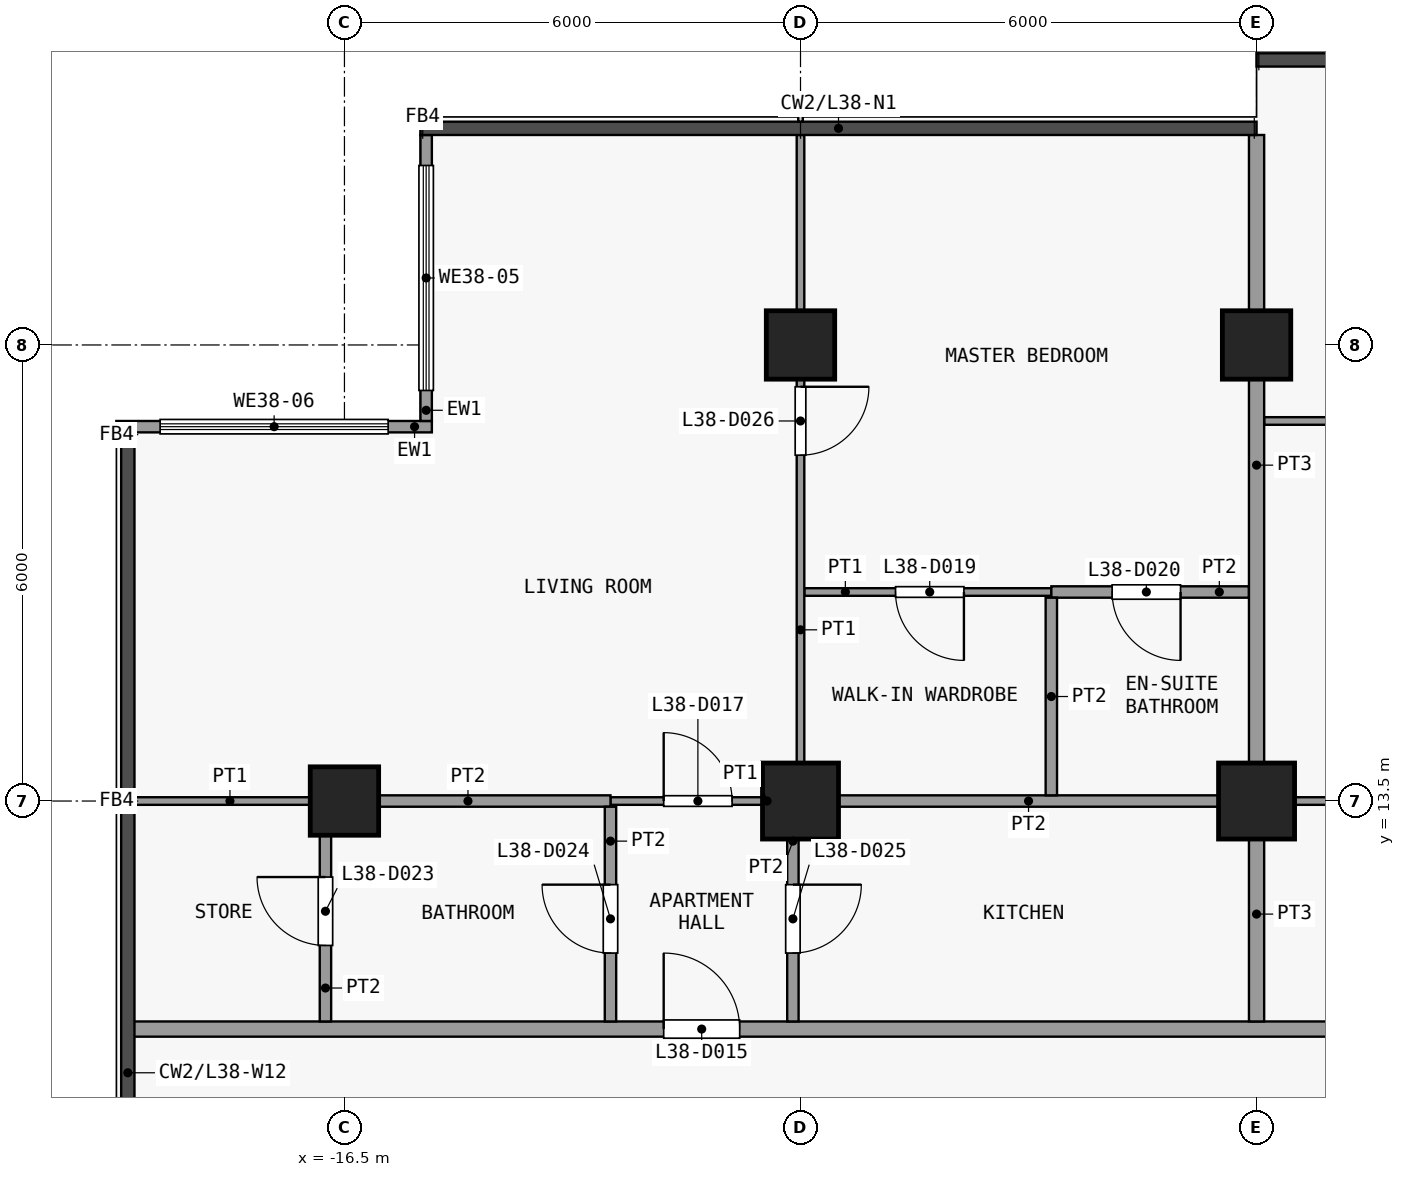
"""IFC4 building model, lengths in metres.
Left out: names, types, materials, properties, quantities, classifications, styles, units other than length and angle.
Written with IfcOpenShell. Run it as: python <this file> out.ifc"""

import sys

from ifc_helpers import new_model, si_unit, direction, frame, frame_2d, origin, origin_2d, place, context, subcontext, project, spatial, rectangle, extrude, element, fill, save


model = new_model("IFC4")
c1 = context("Model", 3, precision=1e-05, world=origin(), true_north=direction((0.0, 1.0)))
c2 = subcontext(c1, "Body", "Model", "MODEL_VIEW")
j1 = project(units=[si_unit("LENGTHUNIT", "METRE"), si_unit("PLANEANGLEUNIT", "RADIAN")], contexts=[c1])
p1 = place(None, origin())
s1 = spatial("IfcSite", under=j1, at=p1, CompositionType="ELEMENT")
p2 = place(p1, origin())
s2 = spatial("IfcBuilding", under=s1, at=p2, CompositionType="ELEMENT")
p3 = place(p2, frame((0.0, 0.0, 156.5)))
s3 = spatial("IfcBuildingStorey", under=s2, at=p3, CompositionType="ELEMENT", Elevation=156.5)
p4 = place(p3, frame((-16.5, 13.5, 0.0), z_axis=(0.0, 0.0, 1.0), x_axis=(1.0, 0.0, 0.0)))
e1 = element("IfcColumn", 1, at=p4, inside=s3, PredefinedType="COLUMN", context=c2, shape_type="SweptSolid", body=[
    extrude(rectangle(XDim=0.9, YDim=0.9, at=origin_2d()), origin(), (0.0, 0.0, 1.0), 3.6),
])
p5 = place(p3, frame((-10.5, 13.5, 0.0), z_axis=(0.0, 0.0, 1.0), x_axis=(1.0, 0.0, 0.0)))
e2 = element("IfcColumn", 2, at=p5, inside=s3, PredefinedType="COLUMN", context=c2, shape_type="SweptSolid", body=[
    extrude(rectangle(XDim=1.0, YDim=1.0, at=origin_2d()), origin(), (0.0, 0.0, 1.0), 3.6),
])
p6 = place(p3, frame((-10.5, 19.5, 0.0), z_axis=(0.0, 0.0, 1.0), x_axis=(1.0, 0.0, 0.0)))
e3 = element("IfcColumn", 3, at=p6, inside=s3, PredefinedType="COLUMN", context=c2, shape_type="SweptSolid", body=[
    extrude(rectangle(XDim=0.9, YDim=0.9, at=origin_2d()), origin(), (0.0, 0.0, 1.0), 3.6),
])
p7 = place(p3, frame((-4.5, 13.5, 0.0), z_axis=(0.0, 0.0, 1.0), x_axis=(1.0, 0.0, 0.0)))
e4 = element("IfcColumn", 4, at=p7, inside=s3, PredefinedType="COLUMN", context=c2, shape_type="SweptSolid", body=[
    extrude(rectangle(XDim=1.0, YDim=1.0, at=origin_2d()), origin(), (0.0, 0.0, 1.0), 3.6),
])
p8 = place(p3, frame((-4.5, 19.5, 0.0), z_axis=(0.0, 0.0, 1.0), x_axis=(1.0, 0.0, 0.0)))
e5 = element("IfcColumn", 5, at=p8, inside=s3, PredefinedType="COLUMN", context=c2, shape_type="SweptSolid", body=[
    extrude(rectangle(XDim=0.9, YDim=0.9, at=origin_2d()), origin(), (0.0, 0.0, 1.0), 3.6),
])
p9 = place(p3, frame((-15.425, 18.5, 0.0), z_axis=(0.0, 0.0, 1.0), x_axis=(0.0, 1.0, 0.0)))
e6 = element("IfcWall", 6, at=p9, inside=s3, PredefinedType="SOLIDWALL", context=c2, shape_type="SweptSolid", body=[
    extrude(rectangle(XDim=3.762, YDim=0.15, at=frame_2d((1.881, 0.0))), origin(), (0.0, 0.0, 1.0), 3.3),
])
p10 = place(p9, frame((0.401, 0.0, 0.9)))
e7 = element("IfcOpeningElement", 7, at=p10, cuts=e6, PredefinedType="OPENING", context=c2, shape_type="SweptSolid", body=[
    extrude(rectangle(XDim=2.96, YDim=2.4, at=frame_2d((1.48, 1.2))), frame((0.0, 0.085, 0.0), z_axis=(0.0, -1.0, 0.0), x_axis=(1.0, 0.0, 0.0)), (0.0, 0.0, 1.0), 0.17),
])
p11 = place(p3, frame((-19.5, 18.425, 0.0), z_axis=(0.0, 0.0, 1.0), x_axis=(1.0, 0.0, 0.0)))
e8 = element("IfcWall", 8, at=p11, inside=s3, PredefinedType="SOLIDWALL", context=c2, shape_type="SweptSolid", body=[
    extrude(rectangle(XDim=4.15, YDim=0.15, at=frame_2d((2.075, 0.0))), origin(), (0.0, 0.0, 1.0), 3.3),
])
p12 = place(p11, frame((0.575, 0.0, 0.9)))
e9 = element("IfcOpeningElement", 9, at=p12, cuts=e8, PredefinedType="OPENING", context=c2, shape_type="SweptSolid", body=[
    extrude(rectangle(XDim=3.0, YDim=2.4, at=frame_2d((1.5, 1.2))), frame((0.0, 0.085, 0.0), z_axis=(0.0, -1.0, 0.0), x_axis=(1.0, 0.0, 0.0)), (0.0, 0.0, 1.0), 0.17),
])
p13 = place(p3, frame((-19.35, 10.5, 0.0), z_axis=(0.0, 0.0, 1.0), x_axis=(1.0, 0.0, 0.0)))
e10 = element("IfcWall", 10, at=p13, inside=s3, PredefinedType="PARTITIONING", context=c2, shape_type="SweptSolid", body=[
    extrude(rectangle(XDim=37.2, YDim=0.2, at=frame_2d((18.6, 0.0))), origin(), (0.0, 0.0, 1.0), 3.3),
])
p14 = place(p13, frame((7.05, 0.0, 0.0)))
e11 = element("IfcOpeningElement", 11, at=p14, cuts=e10, PredefinedType="OPENING", context=c2, shape_type="SweptSolid", body=[
    extrude(rectangle(XDim=1.0, YDim=2.1, at=frame_2d((0.5, 1.05))), frame((0.0, 0.11, 0.0), z_axis=(0.0, -1.0, 0.0), x_axis=(1.0, 0.0, 0.0)), (0.0, 0.0, 1.0), 0.22),
])
p15 = place(p13, frame((24.55, 0.0, 0.0)))
e12 = element("IfcOpeningElement", 12, at=p15, cuts=e10, PredefinedType="OPENING", context=c2, shape_type="SweptSolid", body=[
    extrude(rectangle(XDim=1.0, YDim=2.1, at=frame_2d((0.5, 1.05))), frame((0.0, 0.11, 0.0), z_axis=(0.0, -1.0, 0.0), x_axis=(1.0, 0.0, 0.0)), (0.0, 0.0, 1.0), 0.22),
])
p16 = place(p3, frame((-19.262, 13.5, 0.0), z_axis=(0.0, 0.0, 1.0), x_axis=(1.0, 0.0, 0.0)))
e13 = element("IfcWall", 13, at=p16, inside=s3, PredefinedType="PARTITIONING", context=c2, shape_type="SweptSolid", body=[
    extrude(rectangle(XDim=2.512, YDim=0.1, at=frame_2d((1.256, 0.0))), origin(), (0.0, 0.0, 1.0), 3.3),
])
p17 = place(p3, frame((-13.0, 13.5, 0.0), z_axis=(0.0, 0.0, 1.0), x_axis=(1.0, 0.0, 0.0)))
e14 = element("IfcWall", 14, at=p17, inside=s3, PredefinedType="PARTITIONING", context=c2, shape_type="SweptSolid", body=[
    extrude(rectangle(XDim=2.4, YDim=0.1, at=frame_2d((1.2, 0.0))), origin(), (0.0, 0.0, 1.0), 3.3),
])
p18 = place(p17, frame((0.7, 0.0, 0.0)))
e15 = element("IfcOpeningElement", 15, at=p18, cuts=e14, PredefinedType="OPENING", context=c2, shape_type="SweptSolid", body=[
    extrude(rectangle(XDim=0.9, YDim=2.1, at=frame_2d((0.45, 1.05))), frame((0.0, 0.06, 0.0), z_axis=(0.0, -1.0, 0.0), x_axis=(1.0, 0.0, 0.0)), (0.0, 0.0, 1.0), 0.12),
])
p19 = place(p3, frame((-4.5, 13.5, 0.0), z_axis=(0.0, 0.0, 1.0), x_axis=(1.0, 0.0, 0.0)))
e16 = element("IfcWall", 16, at=p19, inside=s3, PredefinedType="PARTITIONING", context=c2, shape_type="SweptSolid", body=[
    extrude(rectangle(XDim=4.5, YDim=0.1, at=frame_2d((2.25, 0.0))), origin(), (0.0, 0.0, 1.0), 3.3),
])
p20 = place(p3, frame((-16.75, 13.5, 0.0), z_axis=(0.0, 0.0, 1.0), x_axis=(1.0, 0.0, 0.0)))
e17 = element("IfcWall", 17, at=p20, inside=s3, PredefinedType="PARTITIONING", context=c2, shape_type="SweptSolid", body=[
    extrude(rectangle(XDim=3.75, YDim=0.15, at=frame_2d((1.875, 0.0))), origin(), (0.0, 0.0, 1.0), 3.3),
])
p21 = place(p3, frame((-10.5, 13.5, 0.0), z_axis=(0.0, 0.0, 1.0), x_axis=(1.0, 0.0, 0.0)))
e18 = element("IfcWall", 18, at=p21, inside=s3, PredefinedType="PARTITIONING", context=c2, shape_type="SweptSolid", body=[
    extrude(rectangle(XDim=6.0, YDim=0.15, at=frame_2d((3.0, 0.0))), origin(), (0.0, 0.0, 1.0), 3.3),
])
p22 = place(p3, frame((-10.45, 16.25, 0.0), z_axis=(0.0, 0.0, 1.0), x_axis=(1.0, 0.0, 0.0)))
e19 = element("IfcWall", 19, at=p22, inside=s3, PredefinedType="PARTITIONING", context=c2, shape_type="SweptSolid", body=[
    extrude(rectangle(XDim=3.25, YDim=0.1, at=frame_2d((1.625, 0.0))), origin(), (0.0, 0.0, 1.0), 3.3),
])
p23 = place(p22, frame((1.2, 0.0, 0.0)))
e20 = element("IfcOpeningElement", 20, at=p23, cuts=e19, PredefinedType="OPENING", context=c2, shape_type="SweptSolid", body=[
    extrude(rectangle(XDim=0.9, YDim=2.1, at=frame_2d((0.45, 1.05))), frame((0.0, 0.06, 0.0), z_axis=(0.0, -1.0, 0.0), x_axis=(1.0, 0.0, 0.0)), (0.0, 0.0, 1.0), 0.12),
])
p24 = place(p3, frame((-7.2, 16.25, 0.0), z_axis=(0.0, 0.0, 1.0), x_axis=(1.0, 0.0, 0.0)))
e21 = element("IfcWall", 21, at=p24, inside=s3, PredefinedType="PARTITIONING", context=c2, shape_type="SweptSolid", body=[
    extrude(rectangle(XDim=2.6, YDim=0.15, at=frame_2d((1.3, 0.0))), origin(), (0.0, 0.0, 1.0), 3.3),
])
p25 = place(p24, frame((0.8, 0.0, 0.0)))
e22 = element("IfcOpeningElement", 22, at=p25, cuts=e21, PredefinedType="OPENING", context=c2, shape_type="SweptSolid", body=[
    extrude(rectangle(XDim=0.9, YDim=2.1, at=frame_2d((0.45, 1.05))), frame((0.0, 0.085, 0.0), z_axis=(0.0, -1.0, 0.0), x_axis=(1.0, 0.0, 0.0)), (0.0, 0.0, 1.0), 0.17),
])
p26 = place(p3, frame((-4.4, 18.5, 0.0), z_axis=(0.0, 0.0, 1.0), x_axis=(1.0, 0.0, 0.0)))
e23 = element("IfcWall", 23, at=p26, inside=s3, PredefinedType="PARTITIONING", context=c2, shape_type="SweptSolid", body=[
    extrude(rectangle(XDim=8.85, YDim=0.1, at=frame_2d((4.425, 0.0))), origin(), (0.0, 0.0, 1.0), 3.3),
])
p27 = place(p26, frame((4.0, 0.0, 0.0)))
e24 = element("IfcOpeningElement", 24, at=p27, cuts=e23, PredefinedType="OPENING", context=c2, shape_type="SweptSolid", body=[
    extrude(rectangle(XDim=0.9, YDim=2.1, at=frame_2d((0.45, 1.05))), frame((0.0, 0.06, 0.0), z_axis=(0.0, -1.0, 0.0), x_axis=(1.0, 0.0, 0.0)), (0.0, 0.0, 1.0), 0.12),
])
p28 = place(p3, frame((-16.75, 10.6, 0.0), z_axis=(0.0, 0.0, 1.0), x_axis=(0.0, 1.0, 0.0)))
e25 = element("IfcWall", 25, at=p28, inside=s3, PredefinedType="PARTITIONING", context=c2, shape_type="SweptSolid", body=[
    extrude(rectangle(XDim=2.825, YDim=0.15, at=frame_2d((1.413, 0.0))), origin(), (0.0, 0.0, 1.0), 3.3),
])
p29 = place(p28, frame((1.0, 0.0, 0.0)))
e26 = element("IfcOpeningElement", 26, at=p29, cuts=e25, PredefinedType="OPENING", context=c2, shape_type="SweptSolid", body=[
    extrude(rectangle(XDim=0.9, YDim=2.1, at=frame_2d((0.45, 1.05))), frame((0.0, 0.085, 0.0), z_axis=(0.0, -1.0, 0.0), x_axis=(1.0, 0.0, 0.0)), (0.0, 0.0, 1.0), 0.17),
])
p30 = place(p3, frame((-13.0, 10.6, 0.0), z_axis=(0.0, 0.0, 1.0), x_axis=(0.0, 1.0, 0.0)))
e27 = element("IfcWall", 27, at=p30, inside=s3, PredefinedType="PARTITIONING", context=c2, shape_type="SweptSolid", body=[
    extrude(rectangle(XDim=2.825, YDim=0.15, at=frame_2d((1.413, 0.0))), origin(), (0.0, 0.0, 1.0), 3.3),
])
p31 = place(p30, frame((0.9, 0.0, 0.0)))
e28 = element("IfcOpeningElement", 28, at=p31, cuts=e27, PredefinedType="OPENING", context=c2, shape_type="SweptSolid", body=[
    extrude(rectangle(XDim=0.9, YDim=2.1, at=frame_2d((0.45, 1.05))), frame((0.0, 0.085, 0.0), z_axis=(0.0, -1.0, 0.0), x_axis=(1.0, 0.0, 0.0)), (0.0, 0.0, 1.0), 0.17),
])
p32 = place(p3, frame((-10.6, 10.6, 0.0), z_axis=(0.0, 0.0, 1.0), x_axis=(0.0, 1.0, 0.0)))
e29 = element("IfcWall", 29, at=p32, inside=s3, PredefinedType="PARTITIONING", context=c2, shape_type="SweptSolid", body=[
    extrude(rectangle(XDim=2.825, YDim=0.15, at=frame_2d((1.413, 0.0))), origin(), (0.0, 0.0, 1.0), 3.3),
])
p33 = place(p32, frame((0.9, 0.0, 0.0)))
e30 = element("IfcOpeningElement", 30, at=p33, cuts=e29, PredefinedType="OPENING", context=c2, shape_type="SweptSolid", body=[
    extrude(rectangle(XDim=0.9, YDim=2.1, at=frame_2d((0.45, 1.05))), frame((0.0, 0.085, 0.0), z_axis=(0.0, -1.0, 0.0), x_axis=(1.0, 0.0, 0.0)), (0.0, 0.0, 1.0), 0.17),
])
p34 = place(p3, frame((-10.5, 13.575, 0.0), z_axis=(0.0, 0.0, 1.0), x_axis=(0.0, 1.0, 0.0)))
e31 = element("IfcWall", 31, at=p34, inside=s3, PredefinedType="PARTITIONING", context=c2, shape_type="SweptSolid", body=[
    extrude(rectangle(XDim=8.688, YDim=0.1, at=frame_2d((4.344, 0.0))), origin(), (0.0, 0.0, 1.0), 3.3),
])
p35 = place(p34, frame((4.475, 0.0, 0.0)))
e32 = element("IfcOpeningElement", 32, at=p35, cuts=e31, PredefinedType="OPENING", context=c2, shape_type="SweptSolid", body=[
    extrude(rectangle(XDim=0.9, YDim=2.1, at=frame_2d((0.45, 1.05))), frame((0.0, 0.06, 0.0), z_axis=(0.0, -1.0, 0.0), x_axis=(1.0, 0.0, 0.0)), (0.0, 0.0, 1.0), 0.12),
])
p36 = place(p3, frame((-7.2, 13.575, 0.0), z_axis=(0.0, 0.0, 1.0), x_axis=(0.0, 1.0, 0.0)))
e33 = element("IfcWall", 33, at=p36, inside=s3, PredefinedType="PARTITIONING", context=c2, shape_type="SweptSolid", body=[
    extrude(rectangle(XDim=2.6, YDim=0.15, at=frame_2d((1.3, 0.0))), origin(), (0.0, 0.0, 1.0), 3.3),
])
p37 = place(p3, frame((-4.5, 10.6, 0.0), z_axis=(0.0, 0.0, 1.0), x_axis=(0.0, 1.0, 0.0)))
e34 = element("IfcWall", 34, at=p37, inside=s3, PredefinedType="PARTITIONING", context=c2, shape_type="SweptSolid", body=[
    extrude(rectangle(XDim=2.825, YDim=0.2, at=frame_2d((1.413, 0.0))), origin(), (0.0, 0.0, 1.0), 3.3),
])
p38 = place(p3, frame((-4.5, 13.575, 0.0), z_axis=(0.0, 0.0, 1.0), x_axis=(0.0, 1.0, 0.0)))
e35 = element("IfcWall", 35, at=p38, inside=s3, PredefinedType="PARTITIONING", context=c2, shape_type="SweptSolid", body=[
    extrude(rectangle(XDim=8.688, YDim=0.2, at=frame_2d((4.344, 0.0))), origin(), (0.0, 0.0, 1.0), 3.3),
])
p39 = place(p10, origin())
e36 = element("IfcWindow", 36, at=p39, inside=s3, PartitioningType="SINGLE_PANEL", PredefinedType="WINDOW", context=c2, shape_type="SweptSolid", body=[
    extrude(rectangle(XDim=2.96, YDim=2.4, at=frame_2d((1.48, 1.2))), frame((0.0, 0.03, 0.0), z_axis=(0.0, -1.0, 0.0), x_axis=(1.0, 0.0, 0.0)), (0.0, 0.0, 1.0), 0.06),
])
fill(e7, e36)
p40 = place(p12, origin())
e37 = element("IfcWindow", 37, at=p40, inside=s3, PartitioningType="SINGLE_PANEL", PredefinedType="WINDOW", context=c2, shape_type="SweptSolid", body=[
    extrude(rectangle(XDim=3.0, YDim=2.4, at=frame_2d((1.5, 1.2))), frame((0.0, 0.03, 0.0), z_axis=(0.0, -1.0, 0.0), x_axis=(1.0, 0.0, 0.0)), (0.0, 0.0, 1.0), 0.06),
])
fill(e9, e37)
p41 = place(p14, origin())
e38 = element("IfcDoor", 38, at=p41, inside=s3, OperationType="SINGLE_SWING_RIGHT", PredefinedType="DOOR", context=c2, shape_type="SweptSolid", body=[
    extrude(rectangle(XDim=1.0, YDim=2.1, at=frame_2d((0.5, 1.05))), frame((0.0, 0.025, 0.0), z_axis=(0.0, -1.0, 0.0), x_axis=(1.0, 0.0, 0.0)), (0.0, 0.0, 1.0), 0.05),
])
fill(e11, e38)
p42 = place(p18, origin())
e39 = element("IfcDoor", 39, at=p42, inside=s3, OperationType="SINGLE_SWING_RIGHT", PredefinedType="DOOR", context=c2, shape_type="SweptSolid", body=[
    extrude(rectangle(XDim=0.9, YDim=2.1, at=frame_2d((0.45, 1.05))), frame((0.0, 0.025, 0.0), z_axis=(0.0, -1.0, 0.0), x_axis=(1.0, 0.0, 0.0)), (0.0, 0.0, 1.0), 0.05),
])
fill(e15, e39)
p43 = place(p23, origin())
e40 = element("IfcDoor", 40, at=p43, inside=s3, OperationType="SINGLE_SWING_RIGHT", PredefinedType="DOOR", context=c2, shape_type="SweptSolid", body=[
    extrude(rectangle(XDim=0.9, YDim=2.1, at=frame_2d((0.45, 1.05))), frame((0.0, 0.025, 0.0), z_axis=(0.0, -1.0, 0.0), x_axis=(1.0, 0.0, 0.0)), (0.0, 0.0, 1.0), 0.05),
])
fill(e20, e40)
p44 = place(p25, origin())
e41 = element("IfcDoor", 41, at=p44, inside=s3, OperationType="SINGLE_SWING_RIGHT", PredefinedType="DOOR", context=c2, shape_type="SweptSolid", body=[
    extrude(rectangle(XDim=0.9, YDim=2.1, at=frame_2d((0.45, 1.05))), frame((0.0, 0.025, 0.0), z_axis=(0.0, -1.0, 0.0), x_axis=(1.0, 0.0, 0.0)), (0.0, 0.0, 1.0), 0.05),
])
fill(e22, e41)
p45 = place(p29, origin())
e42 = element("IfcDoor", 42, at=p45, inside=s3, OperationType="SINGLE_SWING_LEFT", PredefinedType="DOOR", context=c2, shape_type="SweptSolid", body=[
    extrude(rectangle(XDim=0.9, YDim=2.1, at=frame_2d((0.45, 1.05))), frame((0.0, 0.025, 0.0), z_axis=(0.0, -1.0, 0.0), x_axis=(1.0, 0.0, 0.0)), (0.0, 0.0, 1.0), 0.05),
])
fill(e26, e42)
p46 = place(p31, origin())
e43 = element("IfcDoor", 43, at=p46, inside=s3, OperationType="SINGLE_SWING_LEFT", PredefinedType="DOOR", context=c2, shape_type="SweptSolid", body=[
    extrude(rectangle(XDim=0.9, YDim=2.1, at=frame_2d((0.45, 1.05))), frame((0.0, 0.025, 0.0), z_axis=(0.0, -1.0, 0.0), x_axis=(1.0, 0.0, 0.0)), (0.0, 0.0, 1.0), 0.05),
])
fill(e28, e43)
p47 = place(p33, origin())
e44 = element("IfcDoor", 44, at=p47, inside=s3, OperationType="SINGLE_SWING_RIGHT", PredefinedType="DOOR", context=c2, shape_type="SweptSolid", body=[
    extrude(rectangle(XDim=0.9, YDim=2.1, at=frame_2d((0.45, 1.05))), frame((0.0, 0.025, 0.0), z_axis=(0.0, -1.0, 0.0), x_axis=(1.0, 0.0, 0.0)), (0.0, 0.0, 1.0), 0.05),
])
fill(e30, e44)
p48 = place(p35, origin())
e45 = element("IfcDoor", 45, at=p48, inside=s3, OperationType="SINGLE_SWING_RIGHT", PredefinedType="DOOR", context=c2, shape_type="SweptSolid", body=[
    extrude(rectangle(XDim=0.9, YDim=2.1, at=frame_2d((0.45, 1.05))), frame((0.0, 0.025, 0.0), z_axis=(0.0, -1.0, 0.0), x_axis=(1.0, 0.0, 0.0)), (0.0, 0.0, 1.0), 0.05),
])
fill(e32, e45)
save(model, sys.argv[1])
